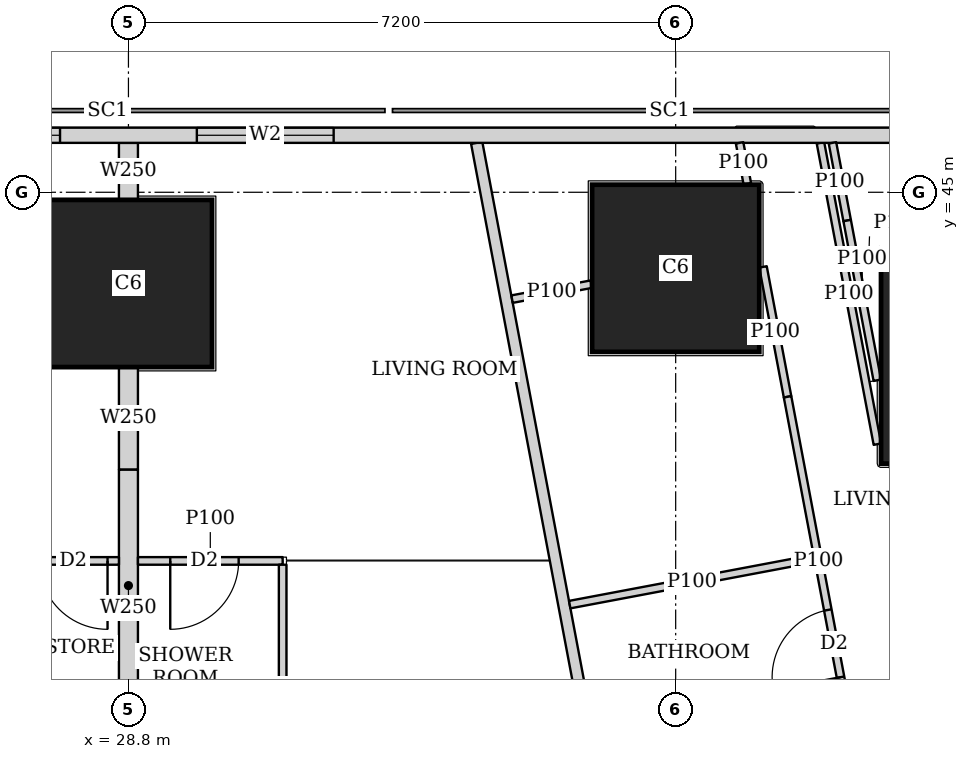
"""IFC4 building model, lengths in metres.
Left out: names, types, materials, properties, quantities, classifications, styles, units other than length and angle.
Written with IfcOpenShell. Run it as: python <this file> out.ifc"""

import sys

from ifc_helpers import new_model, si_unit, direction, frame, frame_2d, origin, origin_2d, place, context, subcontext, project, spatial, rectangle, extrude, element, fill, save


model = new_model("IFC4")
c1 = context("Model", 3, precision=1e-05, world=origin(), true_north=direction((0.0, 1.0)))
c2 = subcontext(c1, "Body", "Model", "MODEL_VIEW")
j1 = project(units=[si_unit("LENGTHUNIT", "METRE"), si_unit("PLANEANGLEUNIT", "RADIAN")], contexts=[c1])
p1 = place(None, origin())
s1 = spatial("IfcSite", under=j1, at=p1, CompositionType="ELEMENT")
p2 = place(p1, origin())
s2 = spatial("IfcBuilding", under=s1, at=p2, CompositionType="ELEMENT")
p3 = place(p2, frame((0.0, 0.0, 122.9)))
s3 = spatial("IfcBuildingStorey", under=s2, at=p3, CompositionType="ELEMENT", Elevation=122.9)
p4 = place(p3, frame((40.102, 42.83, 0.0), z_axis=(0.0, 0.0, 1.0), x_axis=(1.0, 0.0, 0.0)))
e1 = element("IfcColumn", 1, at=p4, inside=s3, PredefinedType="COLUMN", context=c2, shape_type="SweptSolid", body=[
    extrude(rectangle(XDim=2.8, YDim=2.8, at=origin_2d()), origin(), (0.0, 0.0, 1.0), 3.75),
])
for number, where, z_axis, x_axis in (
    (2, (28.8, 43.8, 0.0), (0.0, 0.0, 1.0), (1.0, 0.0, 0.0)),
    (3, (36.0, 44.0, 0.0), (0.0, 0.0, 1.0), (1.0, 0.0, 0.0)),
):
    element("IfcColumn", number, at=place(p3, frame(where, z_axis=z_axis, x_axis=x_axis)), inside=s3, PredefinedType="COLUMN", context=c2, shape_type="SweptSolid", body=[
        extrude(rectangle(XDim=2.2, YDim=2.2, at=origin_2d()), origin(), (0.0, 0.0, 1.0), 3.75),
    ])
p5 = place(p3, frame((40.106, 45.75, 0.0), z_axis=(0.0, 0.0, 1.0), x_axis=(-1.0, 0.0, 0.0)))
e4 = element("IfcWall", 4, at=p5, inside=s3, PredefinedType="SOLIDWALL", context=c2, shape_type="SweptSolid", body=[
    extrude(rectangle(XDim=37.943, YDim=0.2, at=frame_2d((18.971, 0.0))), origin(), (0.0, 0.0, 1.0), 3.5),
])
p6 = place(p5, frame((8.606, 0.0, 0.9)))
e5 = element("IfcOpeningElement", 5, at=p6, cuts=e4, PredefinedType="OPENING", context=c2, shape_type="SweptSolid", body=[
    extrude(rectangle(XDim=1.8, YDim=1.5, at=frame_2d((0.9, 0.75))), frame((0.0, 0.11, 0.0), z_axis=(0.0, -1.0, 0.0), x_axis=(1.0, 0.0, 0.0)), (0.0, 0.0, 1.0), 0.22),
])
p7 = place(p5, frame((12.206, 0.0, 0.9)))
e6 = element("IfcOpeningElement", 6, at=p7, cuts=e4, PredefinedType="OPENING", context=c2, shape_type="SweptSolid", body=[
    extrude(rectangle(XDim=1.8, YDim=1.5, at=frame_2d((0.9, 0.75))), frame((0.0, 0.11, 0.0), z_axis=(0.0, -1.0, 0.0), x_axis=(1.0, 0.0, 0.0)), (0.0, 0.0, 1.0), 0.22),
])
p8 = place(p5, frame((15.806, 0.0, 0.9)))
e7 = element("IfcOpeningElement", 7, at=p8, cuts=e4, PredefinedType="OPENING", context=c2, shape_type="SweptSolid", body=[
    extrude(rectangle(XDim=1.8, YDim=1.5, at=frame_2d((0.9, 0.75))), frame((0.0, 0.11, 0.0), z_axis=(0.0, -1.0, 0.0), x_axis=(1.0, 0.0, 0.0)), (0.0, 0.0, 1.0), 0.22),
])
p9 = place(p5, frame((19.406, 0.0, 0.9)))
e8 = element("IfcOpeningElement", 8, at=p9, cuts=e4, PredefinedType="OPENING", context=c2, shape_type="SweptSolid", body=[
    extrude(rectangle(XDim=1.8, YDim=1.5, at=frame_2d((0.9, 0.75))), frame((0.0, 0.11, 0.0), z_axis=(0.0, -1.0, 0.0), x_axis=(1.0, 0.0, 0.0)), (0.0, 0.0, 1.0), 0.22),
])
p10 = place(p5, frame((23.006, 0.0, 0.9)))
e9 = element("IfcOpeningElement", 9, at=p10, cuts=e4, PredefinedType="OPENING", context=c2, shape_type="SweptSolid", body=[
    extrude(rectangle(XDim=1.8, YDim=1.5, at=frame_2d((0.9, 0.75))), frame((0.0, 0.11, 0.0), z_axis=(0.0, -1.0, 0.0), x_axis=(1.0, 0.0, 0.0)), (0.0, 0.0, 1.0), 0.22),
])
p11 = place(p5, frame((26.606, 0.0, 0.9)))
e10 = element("IfcOpeningElement", 10, at=p11, cuts=e4, PredefinedType="OPENING", context=c2, shape_type="SweptSolid", body=[
    extrude(rectangle(XDim=1.8, YDim=1.5, at=frame_2d((0.9, 0.75))), frame((0.0, 0.11, 0.0), z_axis=(0.0, -1.0, 0.0), x_axis=(1.0, 0.0, 0.0)), (0.0, 0.0, 1.0), 0.22),
])
p12 = place(p3, frame((33.382, 45.65, 0.0), z_axis=(0.0, 0.0, 1.0), x_axis=(0.185593544777, -0.982626600565, 0.0)))
e11 = element("IfcWall", 11, at=p12, inside=s3, PredefinedType="SOLIDWALL", context=c2, shape_type="SweptSolid", body=[
    extrude(rectangle(XDim=47.118, YDim=0.15, at=frame_2d((23.559, 0.0))), origin(), (0.0, 0.0, 1.0), 2.2),
])
p13 = place(p12, frame((10.662, 0.0, 0.0)))
e12 = element("IfcOpeningElement", 12, at=p13, cuts=e11, PredefinedType="OPENING", context=c2, shape_type="SweptSolid", body=[
    extrude(rectangle(XDim=1.0, YDim=2.1, at=frame_2d((0.5, 1.05))), frame((0.0, 0.085, 0.0), z_axis=(0.0, -1.0, 0.0), x_axis=(1.0, 0.0, 0.0)), (0.0, 0.0, 1.0), 0.17),
])
p14 = place(p12, frame((15.237, 0.0, 0.0)))
e13 = element("IfcOpeningElement", 13, at=p14, cuts=e11, PredefinedType="OPENING", context=c2, shape_type="SweptSolid", body=[
    extrude(rectangle(XDim=1.0, YDim=2.1, at=frame_2d((0.5, 1.05))), frame((0.0, 0.085, 0.0), z_axis=(0.0, -1.0, 0.0), x_axis=(1.0, 0.0, 0.0)), (0.0, 0.0, 1.0), 0.17),
])
p15 = place(p12, frame((22.87, 0.0, 0.0)))
e14 = element("IfcOpeningElement", 14, at=p15, cuts=e11, PredefinedType="OPENING", context=c2, shape_type="SweptSolid", body=[
    extrude(rectangle(XDim=1.0, YDim=2.1, at=frame_2d((0.5, 1.05))), frame((0.0, 0.085, 0.0), z_axis=(0.0, -1.0, 0.0), x_axis=(1.0, 0.0, 0.0)), (0.0, 0.0, 1.0), 0.17),
])
p16 = place(p12, frame((33.833, 0.0, 0.0)))
e15 = element("IfcOpeningElement", 15, at=p16, cuts=e11, PredefinedType="OPENING", context=c2, shape_type="SweptSolid", body=[
    extrude(rectangle(XDim=1.0, YDim=2.1, at=frame_2d((0.5, 1.05))), frame((0.0, 0.085, 0.0), z_axis=(0.0, -1.0, 0.0), x_axis=(1.0, 0.0, 0.0)), (0.0, 0.0, 1.0), 0.17),
])
p17 = place(p3, frame((38.654, 41.686, 0.0), z_axis=(0.0, 0.0, 1.0), x_axis=(-0.185676896978, 0.982610853761, 0.0)))
e16 = element("IfcWall", 16, at=p17, inside=s3, PredefinedType="PARTITIONING", context=c2, shape_type="SweptSolid", body=[
    extrude(rectangle(XDim=4.034, YDim=0.1, at=frame_2d((2.017, 0.0))), origin(), (0.0, 0.0, 1.0), 2.05),
])
p18 = place(p3, frame((38.063, 45.65, 0.0), z_axis=(0.0, 0.0, 1.0), x_axis=(0.185677287841, -0.982610779902, 0.0)))
e17 = element("IfcWall", 17, at=p18, inside=s3, PredefinedType="PARTITIONING", context=c2, shape_type="SweptSolid", body=[
    extrude(rectangle(XDim=1.04, YDim=0.1, at=frame_2d((0.52, 0.0))), origin(), (0.0, 0.0, 1.0), 3.5),
])
p19 = place(p3, frame((38.256, 44.628, 0.0), z_axis=(0.0, 0.0, 1.0), x_axis=(0.185674153532, -0.982611372166, 0.0)))
e18 = element("IfcWall", 18, at=p19, inside=s3, PredefinedType="PARTITIONING", context=c2, shape_type="SweptSolid", body=[
    extrude(rectangle(XDim=2.138, YDim=0.1, at=frame_2d((1.069, 0.0))), origin(), (0.0, 0.0, 1.0), 2.05),
])
p20 = place(p3, frame((38.862, 41.42, 0.0), z_axis=(0.0, 0.0, 1.0), x_axis=(0.185332907641, -0.982675792592, 0.0)))
e19 = element("IfcWall", 19, at=p20, inside=s3, PredefinedType="PARTITIONING", context=c2, shape_type="SweptSolid", body=[
    extrude(rectangle(XDim=4.629, YDim=0.1, at=frame_2d((2.314, 0.0))), origin(), (0.0, 0.0, 1.0), 3.5),
])
p21 = place(p20, frame((2.22, 0.0, 0.0)))
e20 = element("IfcOpeningElement", 20, at=p21, cuts=e19, PredefinedType="OPENING", context=c2, shape_type="SweptSolid", body=[
    extrude(rectangle(XDim=0.9, YDim=2.1, at=frame_2d((0.45, 1.05))), frame((0.0, 0.06, 0.0), z_axis=(0.0, -1.0, 0.0), x_axis=(1.0, 0.0, 0.0)), (0.0, 0.0, 1.0), 0.12),
])
p22 = place(p3, frame((36.841, 45.65, 0.0), z_axis=(0.0, 0.0, 1.0), x_axis=(0.185764109712, -0.98259436979, 0.0)))
e21 = element("IfcWall", 21, at=p22, inside=s3, PredefinedType="PARTITIONING", context=c2, shape_type="SweptSolid", body=[
    extrude(rectangle(XDim=0.549, YDim=0.1, at=frame_2d((0.275, 0.0))), origin(), (0.0, 0.0, 1.0), 3.5),
])
p23 = place(p3, frame((37.149, 44.018, 0.0), z_axis=(0.0, 0.0, 1.0), x_axis=(0.185712190756, -0.982604183893, 0.0)))
e22 = element("IfcWall", 22, at=p23, inside=s3, PredefinedType="PARTITIONING", context=c2, shape_type="SweptSolid", body=[
    extrude(rectangle(XDim=1.739, YDim=0.1, at=frame_2d((0.87, 0.0))), origin(), (0.0, 0.0, 1.0), 2.05),
])
p24 = place(p3, frame((37.472, 42.309, 0.0), z_axis=(0.0, 0.0, 1.0), x_axis=(0.185641287362, -0.982617581985, 0.0)))
e23 = element("IfcWall", 23, at=p24, inside=s3, PredefinedType="PARTITIONING", context=c2, shape_type="SweptSolid", body=[
    extrude(rectangle(XDim=4.402, YDim=0.1, at=frame_2d((2.201, 0.0))), origin(), (0.0, 0.0, 1.0), 3.5),
])
p25 = place(p24, frame((2.854, 0.0, 0.0)))
e24 = element("IfcOpeningElement", 24, at=p25, cuts=e23, PredefinedType="OPENING", context=c2, shape_type="SweptSolid", body=[
    extrude(rectangle(XDim=0.9, YDim=2.1, at=frame_2d((0.45, 1.05))), frame((0.0, 0.06, 0.0), z_axis=(0.0, -1.0, 0.0), x_axis=(1.0, 0.0, 0.0)), (0.0, 0.0, 1.0), 0.12),
])
p26 = place(p3, frame((38.692, 44.23, 0.0), z_axis=(0.0, 0.0, 1.0), x_axis=(-0.982944840311, -0.183900627803, 0.0)))
e25 = element("IfcWall", 25, at=p26, inside=s3, PredefinedType="PARTITIONING", context=c2, shape_type="SweptSolid", body=[
    extrude(rectangle(XDim=0.304, YDim=0.1, at=frame_2d((0.152, 0.0))), origin(), (0.0, 0.0, 1.0), 2.05),
])
p27 = place(p3, frame((34.89, 43.791, 0.0), z_axis=(0.0, 0.0, 1.0), x_axis=(-0.982621304855, -0.185621580763, 0.0)))
e26 = element("IfcWall", 26, at=p27, inside=s3, PredefinedType="PARTITIONING", context=c2, shape_type="SweptSolid", body=[
    extrude(rectangle(XDim=1.062, YDim=0.1, at=frame_2d((0.531, 0.0))), origin(), (0.0, 0.0, 1.0), 2.05),
])
p28 = place(p3, frame((37.823, 40.182, 0.0), z_axis=(0.0, 0.0, 1.0), x_axis=(-0.982664729897, -0.18539155487, 0.0)))
e27 = element("IfcWall", 27, at=p28, inside=s3, PredefinedType="PARTITIONING", context=c2, shape_type="SweptSolid", body=[
    extrude(rectangle(XDim=3.274, YDim=0.1, at=frame_2d((1.637, 0.0))), origin(), (0.0, 0.0, 1.0), 3.5),
])
p29 = place(p3, frame((25.2, 40.15, 0.0), z_axis=(0.0, 0.0, 1.0), x_axis=(1.0, 0.0, 0.0)))
e28 = element("IfcWall", 28, at=p29, inside=s3, PredefinedType="PARTITIONING", context=c2, shape_type="SweptSolid", body=[
    extrude(rectangle(XDim=3.475, YDim=0.1, at=frame_2d((1.738, 0.0))), origin(), (0.0, 0.0, 1.0), 3.5),
])
p30 = place(p29, frame((0.655, 0.0, 0.0)))
e29 = element("IfcOpeningElement", 29, at=p30, cuts=e28, PredefinedType="OPENING", context=c2, shape_type="SweptSolid", body=[
    extrude(rectangle(XDim=0.9, YDim=2.1, at=frame_2d((0.45, 1.05))), frame((0.0, 0.06, 0.0), z_axis=(0.0, -1.0, 0.0), x_axis=(1.0, 0.0, 0.0)), (0.0, 0.0, 1.0), 0.12),
])
p31 = place(p29, frame((2.425, 0.0, 0.0)))
e30 = element("IfcOpeningElement", 30, at=p31, cuts=e28, PredefinedType="OPENING", context=c2, shape_type="SweptSolid", body=[
    extrude(rectangle(XDim=0.9, YDim=2.1, at=frame_2d((0.45, 1.05))), frame((0.0, 0.06, 0.0), z_axis=(0.0, -1.0, 0.0), x_axis=(1.0, 0.0, 0.0)), (0.0, 0.0, 1.0), 0.12),
])
p32 = place(p3, frame((28.925, 40.15, 0.0), z_axis=(0.0, 0.0, 1.0), x_axis=(1.0, 0.0, 0.0)))
e31 = element("IfcWall", 31, at=p32, inside=s3, PredefinedType="PARTITIONING", context=c2, shape_type="SweptSolid", body=[
    extrude(rectangle(XDim=1.904, YDim=0.1, at=frame_2d((0.952, 0.0))), origin(), (0.0, 0.0, 1.0), 3.5),
])
p33 = place(p32, frame((0.425, 0.0, 0.0)))
e32 = element("IfcOpeningElement", 32, at=p33, cuts=e31, PredefinedType="OPENING", context=c2, shape_type="SweptSolid", body=[
    extrude(rectangle(XDim=0.9, YDim=2.1, at=frame_2d((0.45, 1.05))), frame((0.0, 0.06, 0.0), z_axis=(0.0, -1.0, 0.0), x_axis=(1.0, 0.0, 0.0)), (0.0, 0.0, 1.0), 0.12),
])
p34 = place(p3, frame((30.829, 36.825, 0.0), z_axis=(0.0, 0.0, 1.0), x_axis=(0.0, 1.0, 0.0)))
e33 = element("IfcWall", 33, at=p34, inside=s3, PredefinedType="PARTITIONING", context=c2, shape_type="SweptSolid", body=[
    extrude(rectangle(XDim=3.275, YDim=0.1, at=frame_2d((1.638, 0.0))), origin(), (0.0, 0.0, 1.0), 3.5),
])
p35 = place(p3, frame((28.8, 41.35, 0.0), z_axis=(0.0, 0.0, 1.0), x_axis=(0.0, 1.0, 0.0)))
e34 = element("IfcWall", 34, at=p35, inside=s3, PredefinedType="SOLIDWALL", context=c2, shape_type="SweptSolid", body=[
    extrude(rectangle(XDim=1.349, YDim=0.25, at=frame_2d((0.674, 0.0))), origin(), (0.0, 0.0, 1.0), 3.5),
])
p36 = place(p3, frame((28.8, 44.901, 0.0), z_axis=(0.0, 0.0, 1.0), x_axis=(0.0, 1.0, 0.0)))
e35 = element("IfcWall", 35, at=p36, inside=s3, PredefinedType="SOLIDWALL", context=c2, shape_type="SweptSolid", body=[
    extrude(rectangle(XDim=0.749, YDim=0.25, at=frame_2d((0.375, 0.0))), origin(), (0.0, 0.0, 1.0), 3.5),
])
p37 = place(p3, frame((28.8, 38.301, 0.0), z_axis=(0.0, 0.0, 1.0), x_axis=(0.0, 1.0, 0.0)))
e36 = element("IfcWall", 36, at=p37, inside=s3, PredefinedType="SOLIDWALL", context=c2, shape_type="SweptSolid", body=[
    extrude(rectangle(XDim=3.049, YDim=0.25, at=frame_2d((1.524, 0.0))), origin(), (0.0, 0.0, 1.0), 3.5),
])
p38 = place(p6, origin())
e37 = element("IfcWindow", 37, at=p38, inside=s3, PartitioningType="SINGLE_PANEL", PredefinedType="WINDOW", context=c2, shape_type="SweptSolid", body=[
    extrude(rectangle(XDim=1.8, YDim=1.5, at=frame_2d((0.9, 0.75))), frame((0.0, 0.03, 0.0), z_axis=(0.0, -1.0, 0.0), x_axis=(1.0, 0.0, 0.0)), (0.0, 0.0, 1.0), 0.06),
])
fill(e5, e37)
p39 = place(p7, origin())
e38 = element("IfcWindow", 38, at=p39, inside=s3, PartitioningType="SINGLE_PANEL", PredefinedType="WINDOW", context=c2, shape_type="SweptSolid", body=[
    extrude(rectangle(XDim=1.8, YDim=1.5, at=frame_2d((0.9, 0.75))), frame((0.0, 0.03, 0.0), z_axis=(0.0, -1.0, 0.0), x_axis=(1.0, 0.0, 0.0)), (0.0, 0.0, 1.0), 0.06),
])
fill(e6, e38)
p40 = place(p25, origin())
e39 = element("IfcDoor", 39, at=p40, inside=s3, OperationType="SINGLE_SWING_LEFT", PredefinedType="DOOR", context=c2, shape_type="SweptSolid", body=[
    extrude(rectangle(XDim=0.9, YDim=2.1, at=frame_2d((0.45, 1.05))), frame((0.0, 0.025, 0.0), z_axis=(0.0, -1.0, 0.0), x_axis=(1.0, 0.0, 0.0)), (0.0, 0.0, 1.0), 0.05),
])
fill(e24, e39)
p41 = place(p31, origin())
e40 = element("IfcDoor", 40, at=p41, inside=s3, OperationType="SINGLE_SWING_LEFT", PredefinedType="DOOR", context=c2, shape_type="SweptSolid", body=[
    extrude(rectangle(XDim=0.9, YDim=2.1, at=frame_2d((0.45, 1.05))), frame((0.0, 0.025, 0.0), z_axis=(0.0, -1.0, 0.0), x_axis=(1.0, 0.0, 0.0)), (0.0, 0.0, 1.0), 0.05),
])
fill(e30, e40)
p42 = place(p33, origin())
e41 = element("IfcDoor", 41, at=p42, inside=s3, OperationType="SINGLE_SWING_RIGHT", PredefinedType="DOOR", context=c2, shape_type="SweptSolid", body=[
    extrude(rectangle(XDim=0.9, YDim=2.1, at=frame_2d((0.45, 1.05))), frame((0.0, 0.025, 0.0), z_axis=(0.0, -1.0, 0.0), x_axis=(1.0, 0.0, 0.0)), (0.0, 0.0, 1.0), 0.05),
])
fill(e32, e41)
save(model, sys.argv[1])
